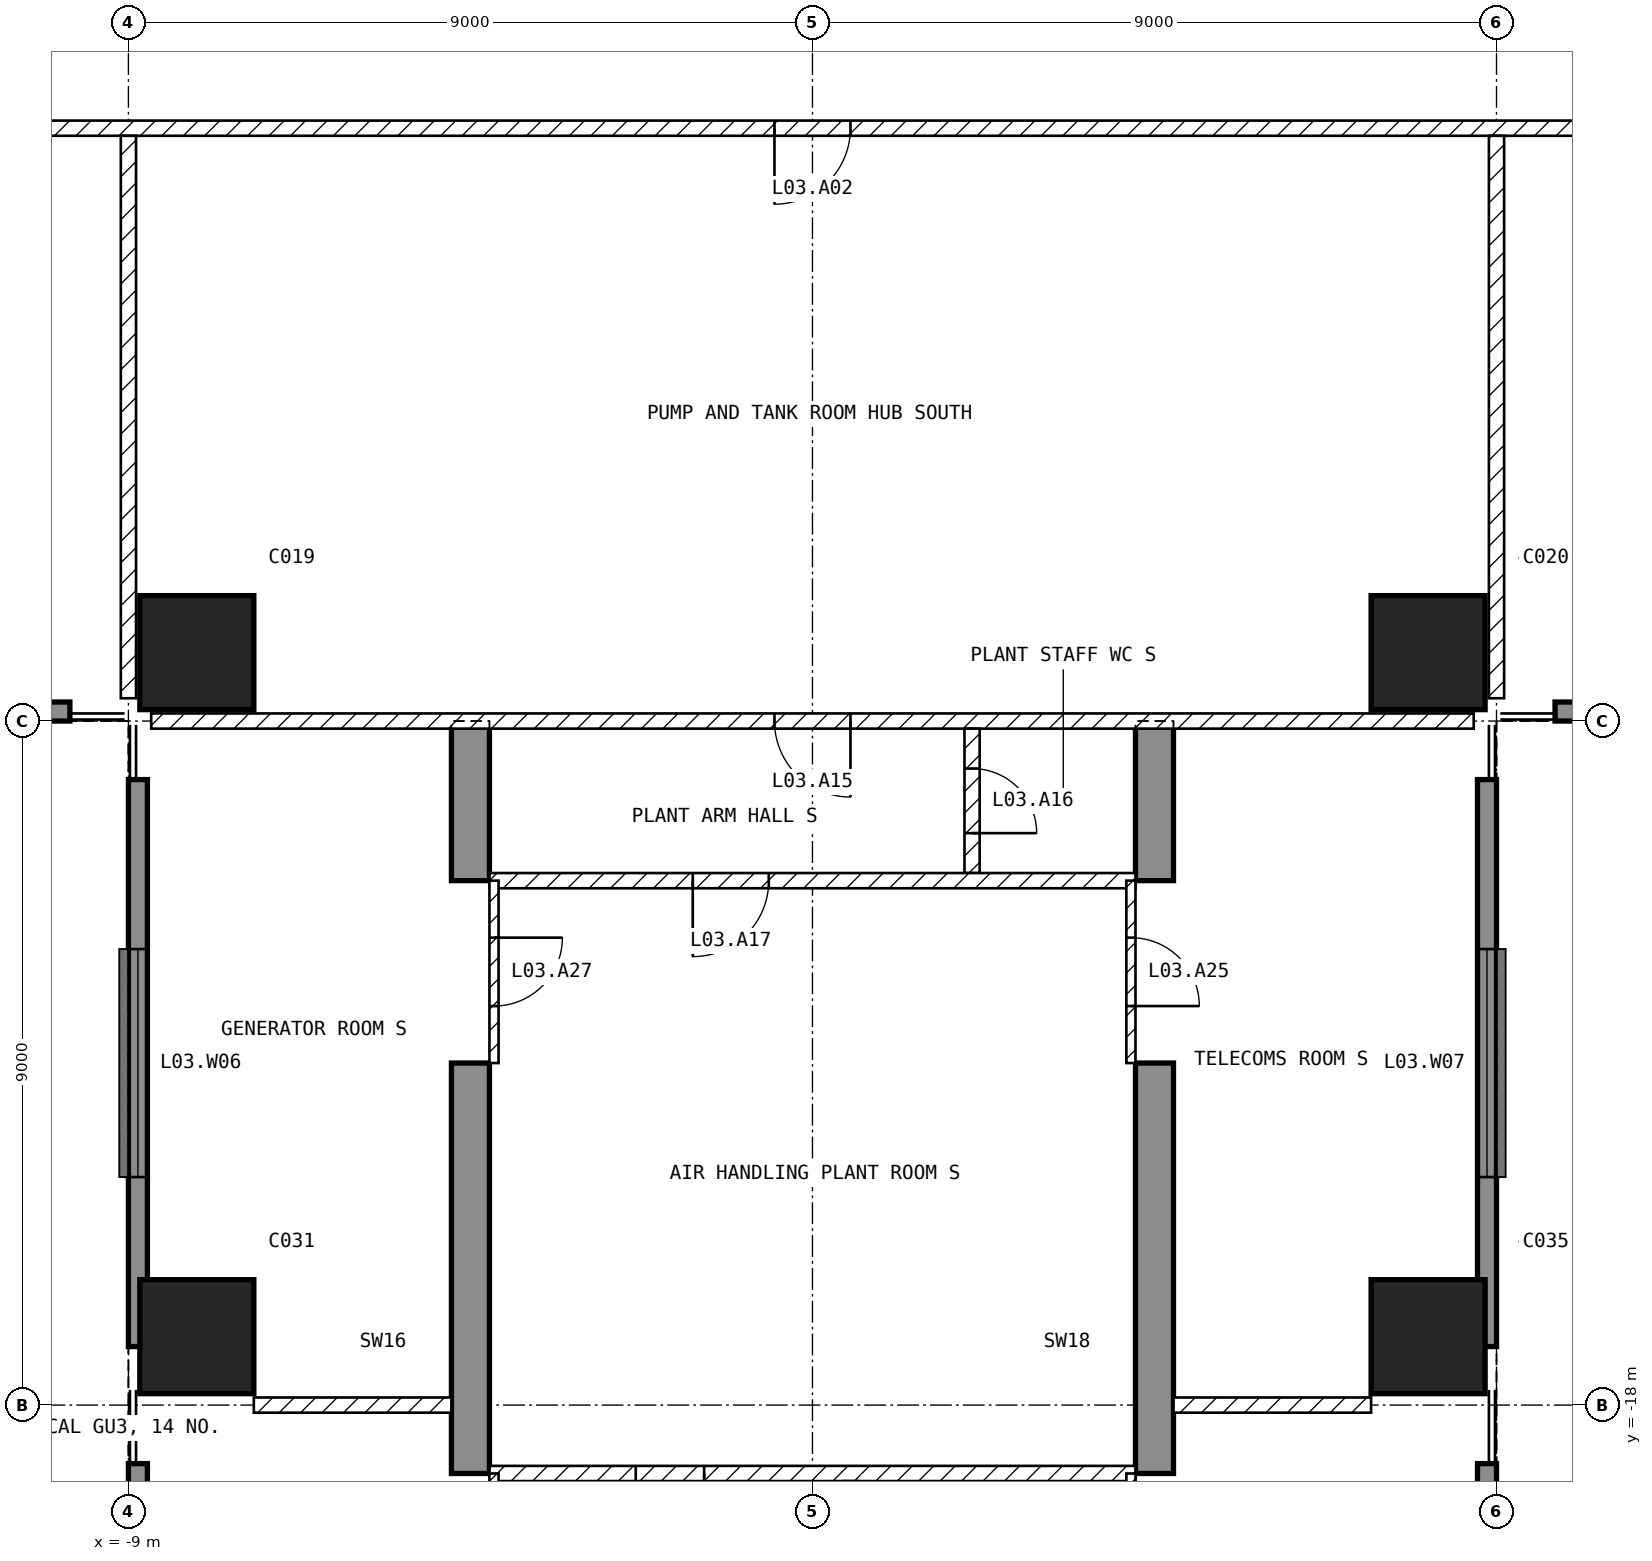
"""IFC4 building model, lengths in metres.
Left out: names, types, materials, properties, quantities, classifications, styles, units other than length and angle.
Written with IfcOpenShell. Run it as: python <this file> out.ifc"""

import sys

from ifc_helpers import new_model, si_unit, direction, frame, frame_2d, origin, origin_2d, place, context, subcontext, project, spatial, polyline, rectangle, outline, extrude, element, fill, save


model = new_model("IFC4")
c1 = context("Model", 3, precision=1e-05, world=origin(), true_north=direction((0.0, 1.0)))
c2 = subcontext(c1, "Body", "Model", "MODEL_VIEW")
j1 = project(units=[si_unit("LENGTHUNIT", "METRE"), si_unit("PLANEANGLEUNIT", "RADIAN")], contexts=[c1])
p1 = place(None, origin())
s1 = spatial("IfcSite", under=j1, at=p1, CompositionType="ELEMENT")
p2 = place(p1, origin())
s2 = spatial("IfcBuilding", under=s1, at=p2, CompositionType="ELEMENT")
p3 = place(p2, frame((0.0, 0.0, 27.0)))
s3 = spatial("IfcBuildingStorey", under=s2, at=p3, CompositionType="ELEMENT", Elevation=27.0)
for number, where, z_axis, x_axis in (
    (1, (-8.1, -17.1, -0.45), (0.0, 0.0, 1.0), (1.0, 0.0, 0.0)),
    (2, (-8.1, -8.1, -0.45), (0.0, 0.0, 1.0), (1.0, 0.0, 0.0)),
    (3, (8.1, -17.1, -0.45), (0.0, 0.0, 1.0), (1.0, 0.0, 0.0)),
    (4, (8.1, -8.1, -0.45), (0.0, 0.0, 1.0), (1.0, 0.0, 0.0)),
):
    element("IfcColumn", number, at=place(p3, frame(where, z_axis=z_axis, x_axis=x_axis)), inside=s3, PredefinedType="COLUMN", context=c2, shape_type="SweptSolid", body=[
        extrude(rectangle(XDim=1.5, YDim=1.5, at=origin_2d()), origin(), (0.0, 0.0, 1.0), 5.15),
    ])
for number, where, z_axis, x_axis in (
    (5, (-4.75, -25.35, -0.45), (1.0, 0.0, 0.0), (0.0, 1.0, 0.0)),
    (6, (4.25, -25.35, -0.45), (1.0, 0.0, 0.0), (0.0, 1.0, 0.0)),
):
    element("IfcWall", number, at=place(p3, frame(where, z_axis=z_axis, x_axis=x_axis)), inside=s3, PredefinedType="SHEAR", context=c2, shape_type="SweptSolid", body=[
        extrude(outline(polyline([(0.0, 0.0), (4.05, 0.0), (4.05, 2.85), (6.45, 2.85), (6.45, 0.0), (11.85, 0.0), (11.85, 2.85), (14.25, 2.85), (14.25, 0.0), (16.35, 0.0), (16.35, 5.15), (0.0, 5.15), (0.0, 0.0)])), origin(), (0.0, 0.0, 1.0), 0.5),
    ])
p4 = place(p3, frame((-17.23, -8.875, 0.0), z_axis=(0.0, 0.0, 1.0), x_axis=(1.0, 0.0, 0.0)))
e7 = element("IfcWall", 7, at=p4, inside=s3, PredefinedType="SOLIDWALL", context=c2, shape_type="SweptSolid", body=[
    extrude(rectangle(XDim=7.46, YDim=0.25, at=frame_2d((3.73, 0.0))), origin(), (0.0, 0.0, 1.0), 4.7),
])
p5 = place(p4, frame((2.23, 0.0, 1.0)))
e8 = element("IfcOpeningElement", 8, at=p5, cuts=e7, PredefinedType="OPENING", context=c2, shape_type="SweptSolid", body=[
    extrude(rectangle(XDim=3.0, YDim=2.4, at=frame_2d((1.5, 1.2))), frame((0.0, 0.135, 0.0), z_axis=(0.0, -1.0, 0.0), x_axis=(1.0, 0.0, 0.0)), (0.0, 0.0, 1.0), 0.27),
])
p6 = place(p3, frame((-8.875, -9.77, 0.0), z_axis=(0.0, 0.0, 1.0), x_axis=(0.0, -1.0, 0.0)))
e9 = element("IfcWall", 9, at=p6, inside=s3, PredefinedType="SOLIDWALL", context=c2, shape_type="SweptSolid", body=[
    extrude(rectangle(XDim=7.46, YDim=0.25, at=frame_2d((3.73, 0.0))), origin(), (0.0, 0.0, 1.0), 4.7),
])
p7 = place(p6, frame((2.23, 0.0, 1.0)))
e10 = element("IfcOpeningElement", 10, at=p7, cuts=e9, PredefinedType="OPENING", context=c2, shape_type="SweptSolid", body=[
    extrude(rectangle(XDim=3.0, YDim=2.4, at=frame_2d((1.5, 1.2))), frame((0.0, 0.135, 0.0), z_axis=(0.0, -1.0, 0.0), x_axis=(1.0, 0.0, 0.0)), (0.0, 0.0, 1.0), 0.27),
])
for number, where, z_axis, x_axis in (
    (11, (-8.875, -18.77, 0.0), (0.0, 0.0, 1.0), (0.0, -1.0, 0.0)),
    (12, (8.875, -22.63, 0.0), (0.0, 0.0, 1.0), (0.0, 1.0, 0.0)),
):
    element("IfcWall", number, at=place(p3, frame(where, z_axis=z_axis, x_axis=x_axis)), inside=s3, PredefinedType="SOLIDWALL", context=c2, shape_type="SweptSolid", body=[
        extrude(rectangle(XDim=3.86, YDim=0.25, at=frame_2d((1.93, 0.0))), origin(), (0.0, 0.0, 1.0), 4.7),
    ])
p8 = place(p3, frame((8.875, -17.23, 0.0), z_axis=(0.0, 0.0, 1.0), x_axis=(0.0, 1.0, 0.0)))
e13 = element("IfcWall", 13, at=p8, inside=s3, PredefinedType="SOLIDWALL", context=c2, shape_type="SweptSolid", body=[
    extrude(rectangle(XDim=7.46, YDim=0.25, at=frame_2d((3.73, 0.0))), origin(), (0.0, 0.0, 1.0), 4.7),
])
p9 = place(p8, frame((2.23, 0.0, 1.0)))
e14 = element("IfcOpeningElement", 14, at=p9, cuts=e13, PredefinedType="OPENING", context=c2, shape_type="SweptSolid", body=[
    extrude(rectangle(XDim=3.0, YDim=2.4, at=frame_2d((1.5, 1.2))), frame((0.0, 0.135, 0.0), z_axis=(0.0, -1.0, 0.0), x_axis=(1.0, 0.0, 0.0)), (0.0, 0.0, 1.0), 0.27),
])
p10 = place(p3, frame((9.77, -8.875, 0.0), z_axis=(0.0, 0.0, 1.0), x_axis=(1.0, 0.0, 0.0)))
e15 = element("IfcWall", 15, at=p10, inside=s3, PredefinedType="SOLIDWALL", context=c2, shape_type="SweptSolid", body=[
    extrude(rectangle(XDim=7.46, YDim=0.25, at=frame_2d((3.73, 0.0))), origin(), (0.0, 0.0, 1.0), 4.7),
])
p11 = place(p10, frame((2.23, 0.0, 1.0)))
e16 = element("IfcOpeningElement", 16, at=p11, cuts=e15, PredefinedType="OPENING", context=c2, shape_type="SweptSolid", body=[
    extrude(rectangle(XDim=3.0, YDim=2.4, at=frame_2d((1.5, 1.2))), frame((0.0, 0.135, 0.0), z_axis=(0.0, -1.0, 0.0), x_axis=(1.0, 0.0, 0.0)), (0.0, 0.0, 1.0), 0.27),
])
p12 = place(p3, frame((21.6, -1.2, 0.0), z_axis=(0.0, 0.0, 1.0), x_axis=(-1.0, 0.0, 0.0)))
e17 = element("IfcWall", 17, at=p12, inside=s3, PredefinedType="PARTITIONING", context=c2, shape_type="SweptSolid", body=[
    extrude(rectangle(XDim=43.2, YDim=0.2, at=frame_2d((21.6, 0.0))), origin(), (0.0, 0.0, 1.0), 4.7),
])
p13 = place(p12, frame((21.1, 0.0, 0.0)))
e18 = element("IfcOpeningElement", 18, at=p13, cuts=e17, PredefinedType="OPENING", context=c2, shape_type="SweptSolid", body=[
    extrude(rectangle(XDim=1.0, YDim=2.1, at=frame_2d((0.5, 1.05))), frame((0.0, 0.11, 0.0), z_axis=(0.0, -1.0, 0.0), x_axis=(1.0, 0.0, 0.0)), (0.0, 0.0, 1.0), 0.22),
])
p14 = place(p12, frame((9.1, 0.0, 0.0)))
e19 = element("IfcOpeningElement", 19, at=p14, cuts=e17, PredefinedType="OPENING", context=c2, shape_type="SweptSolid", body=[
    extrude(rectangle(XDim=1.0, YDim=2.1, at=frame_2d((0.5, 1.05))), frame((0.0, 0.11, 0.0), z_axis=(0.0, -1.0, 0.0), x_axis=(1.0, 0.0, 0.0)), (0.0, 0.0, 1.0), 0.22),
])
p15 = place(p12, frame((2.8, 0.0, 0.0)))
e20 = element("IfcOpeningElement", 20, at=p15, cuts=e17, PredefinedType="OPENING", context=c2, shape_type="SweptSolid", body=[
    extrude(rectangle(XDim=1.0, YDim=2.1, at=frame_2d((0.5, 1.05))), frame((0.0, 0.11, 0.0), z_axis=(0.0, -1.0, 0.0), x_axis=(1.0, 0.0, 0.0)), (0.0, 0.0, 1.0), 0.22),
])
p16 = place(p12, frame((33.7, 0.0, 0.0)))
e21 = element("IfcOpeningElement", 21, at=p16, cuts=e17, PredefinedType="OPENING", context=c2, shape_type="SweptSolid", body=[
    extrude(rectangle(XDim=1.0, YDim=2.1, at=frame_2d((0.5, 1.05))), frame((0.0, 0.11, 0.0), z_axis=(0.0, -1.0, 0.0), x_axis=(1.0, 0.0, 0.0)), (0.0, 0.0, 1.0), 0.22),
])
p17 = place(p12, frame((40.0, 0.0, 0.0)))
e22 = element("IfcOpeningElement", 22, at=p17, cuts=e17, PredefinedType="OPENING", context=c2, shape_type="SweptSolid", body=[
    extrude(rectangle(XDim=1.0, YDim=2.1, at=frame_2d((0.5, 1.05))), frame((0.0, 0.11, 0.0), z_axis=(0.0, -1.0, 0.0), x_axis=(1.0, 0.0, 0.0)), (0.0, 0.0, 1.0), 0.22),
])
for number, where, z_axis, x_axis in (
    (23, (9.0, -1.3, 0.0), (0.0, 0.0, 1.0), (0.0, -1.0, 0.0)),
    (24, (-9.0, -8.7, 0.0), (0.0, 0.0, 1.0), (0.0, 1.0, 0.0)),
):
    element("IfcWall", number, at=place(p3, frame(where, z_axis=z_axis, x_axis=x_axis)), inside=s3, PredefinedType="PARTITIONING", context=c2, shape_type="SweptSolid", body=[
        extrude(rectangle(XDim=7.4, YDim=0.2, at=frame_2d((3.7, 0.0))), origin(), (0.0, 0.0, 1.0), 4.7),
    ])
p18 = place(p3, frame((8.7, -9.0, 0.0), z_axis=(0.0, 0.0, 1.0), x_axis=(-1.0, 0.0, 0.0)))
e25 = element("IfcWall", 25, at=p18, inside=s3, PredefinedType="PARTITIONING", context=c2, shape_type="SweptSolid", body=[
    extrude(rectangle(XDim=17.4, YDim=0.2, at=frame_2d((8.7, 0.0))), origin(), (0.0, 0.0, 1.0), 4.7),
])
p19 = place(p18, frame((8.2, 0.0, 0.0)))
e26 = element("IfcOpeningElement", 26, at=p19, cuts=e25, PredefinedType="OPENING", context=c2, shape_type="SweptSolid", body=[
    extrude(rectangle(XDim=1.0, YDim=2.1, at=frame_2d((0.5, 1.05))), frame((0.0, 0.11, 0.0), z_axis=(0.0, -1.0, 0.0), x_axis=(1.0, 0.0, 0.0)), (0.0, 0.0, 1.0), 0.22),
])
p20 = place(p3, frame((2.1, -9.1, 0.0), z_axis=(0.0, 0.0, 1.0), x_axis=(0.0, -1.0, 0.0)))
e27 = element("IfcWall", 27, at=p20, inside=s3, PredefinedType="PARTITIONING", context=c2, shape_type="SweptSolid", body=[
    extrude(rectangle(XDim=1.9, YDim=0.2, at=frame_2d((0.95, 0.0))), origin(), (0.0, 0.0, 1.0), 4.7),
])
p21 = place(p20, frame((0.525, 0.0, 0.0)))
e28 = element("IfcOpeningElement", 28, at=p21, cuts=e27, PredefinedType="OPENING", context=c2, shape_type="SweptSolid", body=[
    extrude(rectangle(XDim=0.85, YDim=2.1, at=frame_2d((0.425, 1.05))), frame((0.0, 0.11, 0.0), z_axis=(0.0, -1.0, 0.0), x_axis=(1.0, 0.0, 0.0)), (0.0, 0.0, 1.0), 0.22),
])
p22 = place(p3, frame((4.25, -11.1, 0.0), z_axis=(0.0, 0.0, 1.0), x_axis=(-1.0, 0.0, 0.0)))
e29 = element("IfcWall", 29, at=p22, inside=s3, PredefinedType="PARTITIONING", context=c2, shape_type="SweptSolid", body=[
    extrude(rectangle(XDim=8.5, YDim=0.2, at=frame_2d((4.25, 0.0))), origin(), (0.0, 0.0, 1.0), 4.7),
])
p23 = place(p22, frame((4.825, 0.0, 0.0)))
e30 = element("IfcOpeningElement", 30, at=p23, cuts=e29, PredefinedType="OPENING", context=c2, shape_type="SweptSolid", body=[
    extrude(rectangle(XDim=1.0, YDim=2.1, at=frame_2d((0.5, 1.05))), frame((0.0, 0.11, 0.0), z_axis=(0.0, -1.0, 0.0), x_axis=(1.0, 0.0, 0.0)), (0.0, 0.0, 1.0), 0.22),
])
p24 = place(p3, frame((4.25, -18.9, 0.0), z_axis=(0.0, 0.0, 1.0), x_axis=(-1.0, 0.0, 0.0)))
e31 = element("IfcWall", 31, at=p24, inside=s3, PredefinedType="PARTITIONING", context=c2, shape_type="SweptSolid", body=[
    extrude(rectangle(XDim=8.5, YDim=0.2, at=frame_2d((4.25, 0.0))), origin(), (0.0, 0.0, 1.0), 4.7),
])
p25 = place(p24, frame((5.675, 0.0, 0.0)))
e32 = element("IfcOpeningElement", 32, at=p25, cuts=e31, PredefinedType="OPENING", context=c2, shape_type="SweptSolid", body=[
    extrude(rectangle(XDim=0.9, YDim=2.1, at=frame_2d((0.45, 1.05))), frame((0.0, 0.11, 0.0), z_axis=(0.0, -1.0, 0.0), x_axis=(1.0, 0.0, 0.0)), (0.0, 0.0, 1.0), 0.22),
])
p26 = place(p3, frame((0.5, -19.0, 0.0), z_axis=(0.0, 0.0, 1.0), x_axis=(0.0, -1.0, 0.0)))
e33 = element("IfcWall", 33, at=p26, inside=s3, PredefinedType="PARTITIONING", context=c2, shape_type="SweptSolid", body=[
    extrude(rectangle(XDim=4.3, YDim=0.2, at=frame_2d((2.15, 0.0))), origin(), (0.0, 0.0, 1.0), 4.7),
])
p27 = place(p26, frame((1.7, 0.0, 0.0)))
e34 = element("IfcOpeningElement", 34, at=p27, cuts=e33, PredefinedType="OPENING", context=c2, shape_type="SweptSolid", body=[
    extrude(rectangle(XDim=0.9, YDim=2.1, at=frame_2d((0.45, 1.05))), frame((0.0, 0.11, 0.0), z_axis=(0.0, -1.0, 0.0), x_axis=(1.0, 0.0, 0.0)), (0.0, 0.0, 1.0), 0.22),
])
for number, where, z_axis, x_axis in (
    (35, (7.35, -18.0, 0.0), (0.0, 0.0, 1.0), (-1.0, 0.0, 0.0)),
    (36, (-4.75, -18.0, 0.0), (0.0, 0.0, 1.0), (-1.0, 0.0, 0.0)),
):
    element("IfcWall", number, at=place(p3, frame(where, z_axis=z_axis, x_axis=x_axis)), inside=s3, PredefinedType="PARTITIONING", context=c2, shape_type="SweptSolid", body=[
        extrude(rectangle(XDim=2.6, YDim=0.2, at=frame_2d((1.3, 0.0))), origin(), (0.0, 0.0, 1.0), 4.7),
    ])
p28 = place(p3, frame((4.19, -11.1, 0.0), z_axis=(0.0, 0.0, 1.0), x_axis=(0.0, -1.0, 0.0)))
e37 = element("IfcWall", 37, at=p28, inside=s3, PredefinedType="PARTITIONING", context=c2, shape_type="SweptSolid", body=[
    extrude(rectangle(XDim=2.4, YDim=0.12, at=frame_2d((1.2, 0.0))), origin(), (0.0, 0.0, 1.0), 2.4),
])
p29 = place(p28, frame((0.75, 0.0, 0.0)))
e38 = element("IfcOpeningElement", 38, at=p29, cuts=e37, PredefinedType="OPENING", context=c2, shape_type="SweptSolid", body=[
    extrude(rectangle(XDim=0.9, YDim=2.1, at=frame_2d((0.45, 1.05))), frame((0.0, 0.07, 0.0), z_axis=(0.0, -1.0, 0.0), x_axis=(1.0, 0.0, 0.0)), (0.0, 0.0, 1.0), 0.14),
])
p30 = place(p3, frame((4.19, -18.9, 0.0), z_axis=(0.0, 0.0, 1.0), x_axis=(0.0, -1.0, 0.0)))
e39 = element("IfcWall", 39, at=p30, inside=s3, PredefinedType="PARTITIONING", context=c2, shape_type="SweptSolid", body=[
    extrude(rectangle(XDim=2.4, YDim=0.12, at=frame_2d((1.2, 0.0))), origin(), (0.0, 0.0, 1.0), 2.4),
])
p31 = place(p30, frame((0.75, 0.0, 0.0)))
e40 = element("IfcOpeningElement", 40, at=p31, cuts=e39, PredefinedType="OPENING", context=c2, shape_type="SweptSolid", body=[
    extrude(rectangle(XDim=0.9, YDim=2.1, at=frame_2d((0.45, 1.05))), frame((0.0, 0.07, 0.0), z_axis=(0.0, -1.0, 0.0), x_axis=(1.0, 0.0, 0.0)), (0.0, 0.0, 1.0), 0.14),
])
p32 = place(p3, frame((-4.19, -11.1, 0.0), z_axis=(0.0, 0.0, 1.0), x_axis=(0.0, -1.0, 0.0)))
e41 = element("IfcWall", 41, at=p32, inside=s3, PredefinedType="PARTITIONING", context=c2, shape_type="SweptSolid", body=[
    extrude(rectangle(XDim=2.4, YDim=0.12, at=frame_2d((1.2, 0.0))), origin(), (0.0, 0.0, 1.0), 2.4),
])
p33 = place(p32, frame((0.75, 0.0, 0.0)))
e42 = element("IfcOpeningElement", 42, at=p33, cuts=e41, PredefinedType="OPENING", context=c2, shape_type="SweptSolid", body=[
    extrude(rectangle(XDim=0.9, YDim=2.1, at=frame_2d((0.45, 1.05))), frame((0.0, 0.07, 0.0), z_axis=(0.0, -1.0, 0.0), x_axis=(1.0, 0.0, 0.0)), (0.0, 0.0, 1.0), 0.14),
])
p34 = place(p3, frame((-4.19, -18.9, 0.0), z_axis=(0.0, 0.0, 1.0), x_axis=(0.0, -1.0, 0.0)))
e43 = element("IfcWall", 43, at=p34, inside=s3, PredefinedType="PARTITIONING", context=c2, shape_type="SweptSolid", body=[
    extrude(rectangle(XDim=2.4, YDim=0.12, at=frame_2d((1.2, 0.0))), origin(), (0.0, 0.0, 1.0), 2.4),
])
p35 = place(p34, frame((0.75, 0.0, 0.0)))
e44 = element("IfcOpeningElement", 44, at=p35, cuts=e43, PredefinedType="OPENING", context=c2, shape_type="SweptSolid", body=[
    extrude(rectangle(XDim=0.9, YDim=2.1, at=frame_2d((0.45, 1.05))), frame((0.0, 0.07, 0.0), z_axis=(0.0, -1.0, 0.0), x_axis=(1.0, 0.0, 0.0)), (0.0, 0.0, 1.0), 0.14),
])
p36 = place(p7, origin())
e45 = element("IfcWindow", 45, at=p36, inside=s3, PartitioningType="SINGLE_PANEL", PredefinedType="WINDOW", context=c2, shape_type="SweptSolid", body=[
    extrude(rectangle(XDim=3.0, YDim=2.4, at=frame_2d((1.5, 1.2))), frame((0.0, 0.03, 0.0), z_axis=(0.0, -1.0, 0.0), x_axis=(1.0, 0.0, 0.0)), (0.0, 0.0, 1.0), 0.06),
])
fill(e10, e45)
p37 = place(p9, origin())
e46 = element("IfcWindow", 46, at=p37, inside=s3, PartitioningType="SINGLE_PANEL", PredefinedType="WINDOW", context=c2, shape_type="SweptSolid", body=[
    extrude(rectangle(XDim=3.0, YDim=2.4, at=frame_2d((1.5, 1.2))), frame((0.0, 0.03, 0.0), z_axis=(0.0, -1.0, 0.0), x_axis=(1.0, 0.0, 0.0)), (0.0, 0.0, 1.0), 0.06),
])
fill(e14, e46)
p38 = place(p13, origin())
e47 = element("IfcDoor", 47, at=p38, inside=s3, OperationType="SINGLE_SWING_RIGHT", PredefinedType="DOOR", context=c2, shape_type="SweptSolid", body=[
    extrude(rectangle(XDim=1.0, YDim=2.1, at=frame_2d((0.5, 1.05))), frame((0.0, 0.025, 0.0), z_axis=(0.0, -1.0, 0.0), x_axis=(1.0, 0.0, 0.0)), (0.0, 0.0, 1.0), 0.05),
])
fill(e18, e47)
p39 = place(p19, origin())
e48 = element("IfcDoor", 48, at=p39, inside=s3, OperationType="SINGLE_SWING_LEFT", PredefinedType="DOOR", context=c2, shape_type="SweptSolid", body=[
    extrude(rectangle(XDim=1.0, YDim=2.1, at=frame_2d((0.5, 1.05))), frame((0.0, 0.025, 0.0), z_axis=(0.0, -1.0, 0.0), x_axis=(1.0, 0.0, 0.0)), (0.0, 0.0, 1.0), 0.05),
])
fill(e26, e48)
p40 = place(p21, origin())
e49 = element("IfcDoor", 49, at=p40, inside=s3, OperationType="SINGLE_SWING_RIGHT", PredefinedType="DOOR", context=c2, shape_type="SweptSolid", body=[
    extrude(rectangle(XDim=0.85, YDim=2.1, at=frame_2d((0.425, 1.05))), frame((0.0, 0.025, 0.0), z_axis=(0.0, -1.0, 0.0), x_axis=(1.0, 0.0, 0.0)), (0.0, 0.0, 1.0), 0.05),
])
fill(e28, e49)
p41 = place(p23, origin())
e50 = element("IfcDoor", 50, at=p41, inside=s3, OperationType="SINGLE_SWING_RIGHT", PredefinedType="DOOR", context=c2, shape_type="SweptSolid", body=[
    extrude(rectangle(XDim=1.0, YDim=2.1, at=frame_2d((0.5, 1.05))), frame((0.0, 0.025, 0.0), z_axis=(0.0, -1.0, 0.0), x_axis=(1.0, 0.0, 0.0)), (0.0, 0.0, 1.0), 0.05),
])
fill(e30, e50)
p42 = place(p25, origin())
e51 = element("IfcDoor", 51, at=p42, inside=s3, OperationType="SINGLE_SWING_LEFT", PredefinedType="DOOR", context=c2, shape_type="SweptSolid", body=[
    extrude(rectangle(XDim=0.9, YDim=2.1, at=frame_2d((0.45, 1.05))), frame((0.0, 0.025, 0.0), z_axis=(0.0, -1.0, 0.0), x_axis=(1.0, 0.0, 0.0)), (0.0, 0.0, 1.0), 0.05),
])
fill(e32, e51)
p43 = place(p29, origin())
e52 = element("IfcDoor", 52, at=p43, inside=s3, OperationType="SINGLE_SWING_RIGHT", PredefinedType="DOOR", context=c2, shape_type="SweptSolid", body=[
    extrude(rectangle(XDim=0.9, YDim=2.1, at=frame_2d((0.45, 1.05))), frame((0.0, 0.025, 0.0), z_axis=(0.0, -1.0, 0.0), x_axis=(1.0, 0.0, 0.0)), (0.0, 0.0, 1.0), 0.05),
])
fill(e38, e52)
p44 = place(p33, origin())
e53 = element("IfcDoor", 53, at=p44, inside=s3, OperationType="SINGLE_SWING_LEFT", PredefinedType="DOOR", context=c2, shape_type="SweptSolid", body=[
    extrude(rectangle(XDim=0.9, YDim=2.1, at=frame_2d((0.45, 1.05))), frame((0.0, 0.025, 0.0), z_axis=(0.0, -1.0, 0.0), x_axis=(1.0, 0.0, 0.0)), (0.0, 0.0, 1.0), 0.05),
])
fill(e42, e53)
save(model, sys.argv[1])
